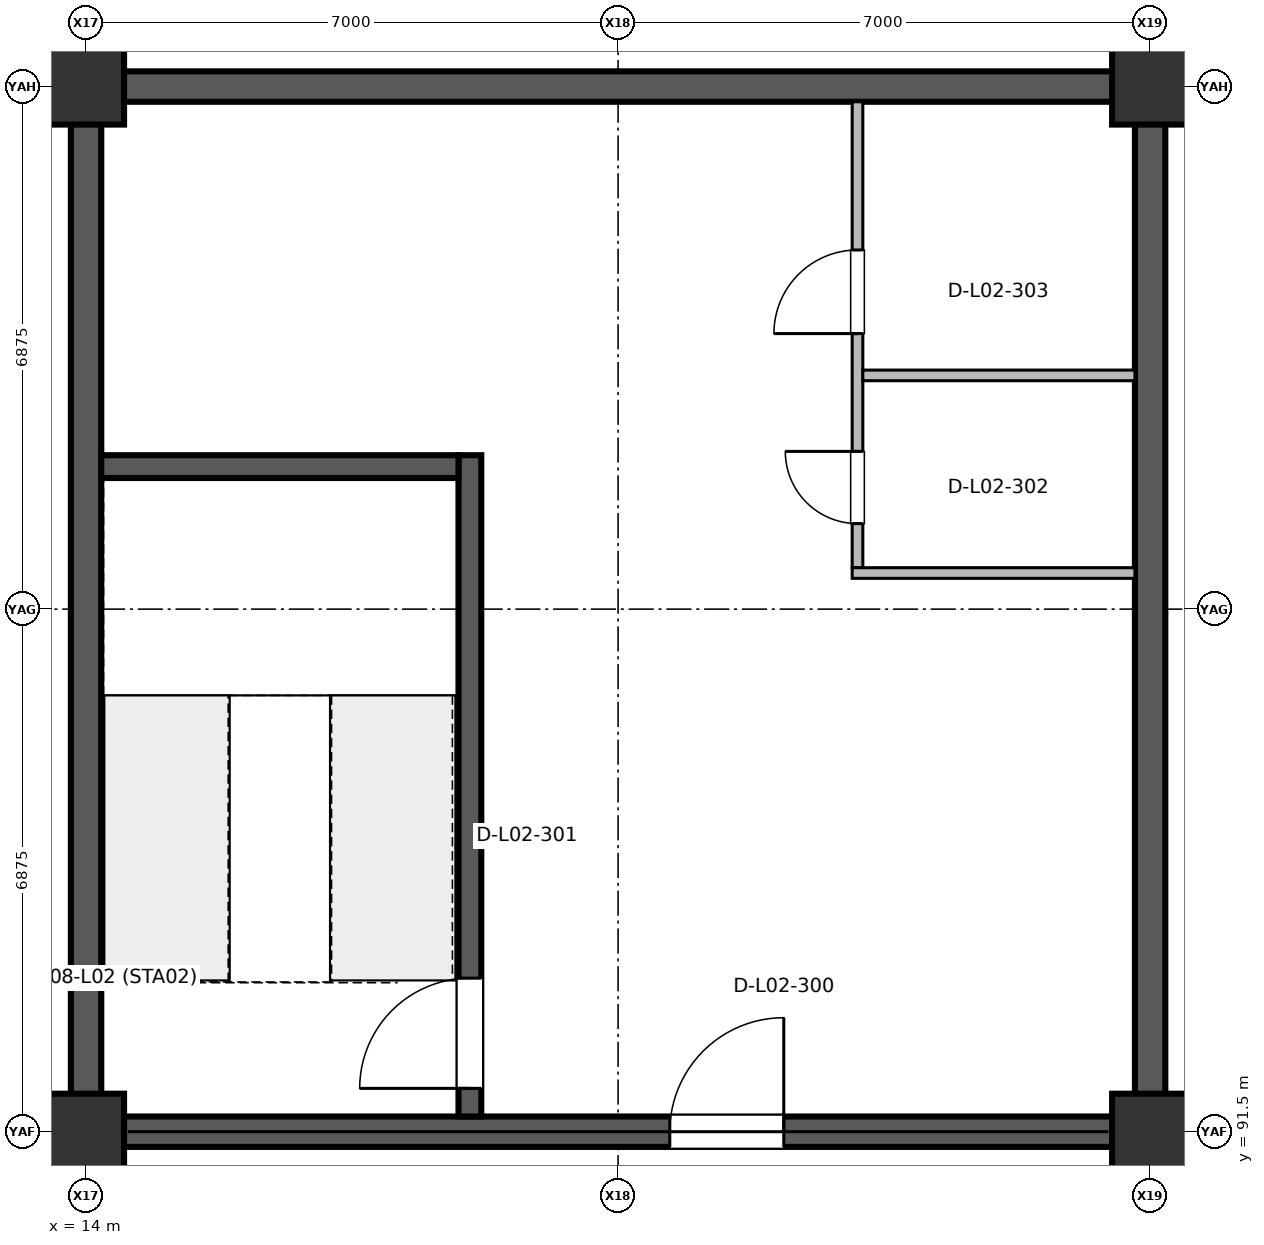
"""IFC4 building model, lengths in metres.
Left out: names, types, materials, properties, quantities, classifications, styles, units other than length and angle.
Written with IfcOpenShell. Run it as: python <this file> out.ifc"""

import sys

from ifc_helpers import new_model, si_unit, direction, frame, frame_2d, origin, origin_2d, place, context, subcontext, project, spatial, rectangle, circle, extrude, element, fill, save


model = new_model("IFC4")
c1 = context("Model", 3, precision=1e-05, world=origin(), true_north=direction((0.0, 1.0)))
c2 = subcontext(c1, "Body", "Model", "MODEL_VIEW")
j1 = project(units=[si_unit("LENGTHUNIT", "METRE"), si_unit("PLANEANGLEUNIT", "RADIAN")], contexts=[c1])
p1 = place(None, origin())
s1 = spatial("IfcSite", under=j1, at=p1, CompositionType="ELEMENT")
p2 = place(p1, origin())
s2 = spatial("IfcBuilding", under=s1, at=p2, CompositionType="ELEMENT")
p3 = place(p2, frame((0.0, 0.0, 6.0)))
s3 = spatial("IfcBuildingStorey", under=s2, at=p3, CompositionType="ELEMENT", Elevation=6.0)
for number, where, z_axis, x_axis in (
    (1, (14.0, 91.5, 0.0), (0.0, 0.0, 1.0), (1.0, 0.0, 0.0)),
    (2, (14.0, 105.25, 0.0), (0.0, 0.0, 1.0), (1.0, 0.0, 0.0)),
    (3, (28.0, 91.5, 0.0), (0.0, 0.0, 1.0), (1.0, 0.0, 0.0)),
    (4, (28.0, 105.25, 0.0), (0.0, 0.0, 1.0), (1.0, 0.0, 0.0)),
):
    element("IfcColumn", number, at=place(p3, frame(where, z_axis=z_axis, x_axis=x_axis)), inside=s3, PredefinedType="COLUMN", context=c2, shape_type="SweptSolid", body=[
        extrude(circle(Radius=0.5, at=origin_2d()), origin(), (0.0, 0.0, 1.0), 5.398),
    ])
for number, where, z_axis, x_axis in (
    (5, (14.0, 91.7, 0.0), (0.0, 0.0, 1.0), (0.0, 1.0, 0.0)),
    (6, (28.0, 91.7, 0.0), (0.0, 0.0, 1.0), (0.0, 1.0, 0.0)),
):
    element("IfcWall", number, at=place(p3, frame(where, z_axis=z_axis, x_axis=x_axis)), inside=s3, PredefinedType="SHEAR", context=c2, shape_type="SweptSolid", body=[
        extrude(rectangle(XDim=13.35, YDim=0.4, at=frame_2d((6.675, 0.0))), origin(), (0.0, 0.0, 1.0), 5.2),
    ])
p4 = place(p3, frame((14.2, 91.5, 0.0), z_axis=(0.0, 0.0, 1.0), x_axis=(1.0, 0.0, 0.0)))
e7 = element("IfcWall", 7, at=p4, inside=s3, PredefinedType="SHEAR", context=c2, shape_type="SweptSolid", body=[
    extrude(rectangle(XDim=13.6, YDim=0.4, at=frame_2d((6.8, 0.0))), origin(), (0.0, 0.0, 1.0), 5.2),
])
p5 = place(p4, frame((7.48, 0.0, 0.0)))
e8 = element("IfcOpeningElement", 8, at=p5, cuts=e7, PredefinedType="OPENING", context=c2, shape_type="SweptSolid", body=[
    extrude(rectangle(XDim=1.5, YDim=2.2, at=frame_2d((0.75, 1.1))), frame((0.0, 0.21, 0.0), z_axis=(0.0, -1.0, 0.0), x_axis=(1.0, 0.0, 0.0)), (0.0, 0.0, 1.0), 0.42),
])
p6 = place(p3, frame((14.2, 105.25, 0.0), z_axis=(0.0, 0.0, 1.0), x_axis=(1.0, 0.0, 0.0)))
e9 = element("IfcWall", 9, at=p6, inside=s3, PredefinedType="SHEAR", context=c2, shape_type="SweptSolid", body=[
    extrude(rectangle(XDim=13.6, YDim=0.4, at=frame_2d((6.8, 0.0))), origin(), (0.0, 0.0, 1.0), 5.2),
])
p7 = place(p3, frame((19.05, 91.7, 0.0), z_axis=(0.0, 0.0, 1.0), x_axis=(0.0, 1.0, 0.0)))
e10 = element("IfcWall", 10, at=p7, inside=s3, PredefinedType="SHEAR", context=c2, shape_type="SweptSolid", body=[
    extrude(rectangle(XDim=8.7, YDim=0.3, at=frame_2d((4.35, 0.0))), origin(), (0.0, 0.0, 1.0), 5.2),
])
p8 = place(p7, frame((0.37, 0.0, 0.0)))
e11 = element("IfcOpeningElement", 11, at=p8, cuts=e10, PredefinedType="OPENING", context=c2, shape_type="SweptSolid", body=[
    extrude(rectangle(XDim=1.45, YDim=2.2, at=frame_2d((0.725, 1.1))), frame((0.0, 0.16, 0.0), z_axis=(0.0, -1.0, 0.0), x_axis=(1.0, 0.0, 0.0)), (0.0, 0.0, 1.0), 0.32),
])
p9 = place(p3, frame((24.15, 98.92, 0.0), z_axis=(0.0, 0.0, 1.0), x_axis=(0.0, 1.0, 0.0)))
e12 = element("IfcWall", 12, at=p9, inside=s3, PredefinedType="PARTITIONING", context=c2, shape_type="SweptSolid", body=[
    extrude(rectangle(XDim=6.13, YDim=0.14, at=frame_2d((3.065, 0.0))), origin(), (0.0, 0.0, 1.0), 4.42),
])
p10 = place(p9, frame((0.58, 0.0, 0.0)))
e13 = element("IfcOpeningElement", 13, at=p10, cuts=e12, PredefinedType="OPENING", context=c2, shape_type="SweptSolid", body=[
    extrude(rectangle(XDim=0.95, YDim=2.15, at=frame_2d((0.475, 1.075))), frame((0.0, 0.08, 0.0), z_axis=(0.0, -1.0, 0.0), x_axis=(1.0, 0.0, 0.0)), (0.0, 0.0, 1.0), 0.16),
])
p11 = place(p9, frame((3.08, 0.0, 0.0)))
e14 = element("IfcOpeningElement", 14, at=p11, cuts=e12, PredefinedType="OPENING", context=c2, shape_type="SweptSolid", body=[
    extrude(rectangle(XDim=1.1, YDim=2.15, at=frame_2d((0.55, 1.075))), frame((0.0, 0.08, 0.0), z_axis=(0.0, -1.0, 0.0), x_axis=(1.0, 0.0, 0.0)), (0.0, 0.0, 1.0), 0.16),
])
p12 = place(p3, frame((24.08, 98.85, 0.0), z_axis=(0.0, 0.0, 1.0), x_axis=(1.0, 0.0, 0.0)))
e15 = element("IfcWall", 15, at=p12, inside=s3, PredefinedType="PARTITIONING", context=c2, shape_type="SweptSolid", body=[
    extrude(rectangle(XDim=3.72, YDim=0.14, at=frame_2d((1.86, 0.0))), origin(), (0.0, 0.0, 1.0), 4.42),
])
p13 = place(p3, frame((24.22, 101.45, 0.0), z_axis=(0.0, 0.0, 1.0), x_axis=(1.0, 0.0, 0.0)))
e16 = element("IfcWall", 16, at=p13, inside=s3, PredefinedType="PARTITIONING", context=c2, shape_type="SweptSolid", body=[
    extrude(rectangle(XDim=3.58, YDim=0.14, at=frame_2d((1.79, 0.0))), origin(), (0.0, 0.0, 1.0), 4.42),
])
p14 = place(p3, frame((14.2, 100.25, 0.0), z_axis=(0.0, 0.0, 1.0), x_axis=(1.0, 0.0, 0.0)))
e17 = element("IfcWall", 17, at=p14, inside=s3, PredefinedType="SHEAR", context=c2, shape_type="SweptSolid", body=[
    extrude(rectangle(XDim=4.7, YDim=0.3, at=frame_2d((2.35, 0.0))), origin(), (0.0, 0.0, 1.0), 5.2),
])
p15 = place(p5, origin())
e18 = element("IfcDoor", 18, at=p15, inside=s3, OperationType="SINGLE_SWING_RIGHT", PredefinedType="DOOR", context=c2, shape_type="SweptSolid", body=[
    extrude(rectangle(XDim=1.5, YDim=2.2, at=frame_2d((0.75, 1.1))), frame((0.0, 0.025, 0.0), z_axis=(0.0, -1.0, 0.0), x_axis=(1.0, 0.0, 0.0)), (0.0, 0.0, 1.0), 0.05),
])
fill(e8, e18)
p16 = place(p8, origin())
e19 = element("IfcDoor", 19, at=p16, inside=s3, OperationType="SINGLE_SWING_LEFT", PredefinedType="DOOR", context=c2, shape_type="SweptSolid", body=[
    extrude(rectangle(XDim=1.45, YDim=2.2, at=frame_2d((0.725, 1.1))), frame((0.0, 0.025, 0.0), z_axis=(0.0, -1.0, 0.0), x_axis=(1.0, 0.0, 0.0)), (0.0, 0.0, 1.0), 0.05),
])
fill(e11, e19)
p17 = place(p10, origin())
e20 = element("IfcDoor", 20, at=p17, inside=s3, OperationType="SINGLE_SWING_RIGHT", PredefinedType="DOOR", context=c2, shape_type="SweptSolid", body=[
    extrude(rectangle(XDim=0.95, YDim=2.15, at=frame_2d((0.475, 1.075))), frame((0.0, 0.025, 0.0), z_axis=(0.0, -1.0, 0.0), x_axis=(1.0, 0.0, 0.0)), (0.0, 0.0, 1.0), 0.05),
])
fill(e13, e20)
p18 = place(p11, origin())
e21 = element("IfcDoor", 21, at=p18, inside=s3, OperationType="SINGLE_SWING_LEFT", PredefinedType="DOOR", context=c2, shape_type="SweptSolid", body=[
    extrude(rectangle(XDim=1.1, YDim=2.15, at=frame_2d((0.55, 1.075))), frame((0.0, 0.025, 0.0), z_axis=(0.0, -1.0, 0.0), x_axis=(1.0, 0.0, 0.0)), (0.0, 0.0, 1.0), 0.05),
])
fill(e14, e21)
save(model, sys.argv[1])
